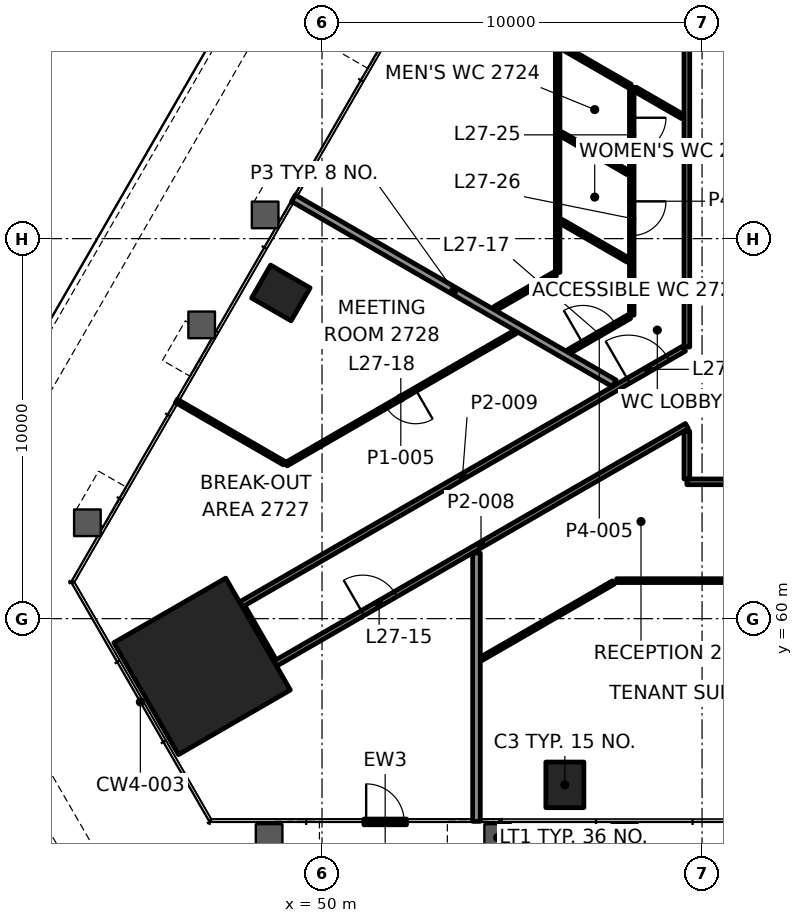
"""IFC4 building model, lengths in metres.
Left out: names, types, materials, properties, quantities, classifications, styles, units other than length and angle.
Written with IfcOpenShell. Run it as: python <this file> out.ifc"""

import sys

from ifc_helpers import new_model, si_unit, direction, frame, frame_2d, origin, origin_2d, place, context, subcontext, project, spatial, rectangle, extrude, element, fill, save


model = new_model("IFC4")
c1 = context("Model", 3, precision=1e-05, world=origin(), true_north=direction((0.0, 1.0)))
c2 = subcontext(c1, "Body", "Model", "MODEL_VIEW")
j1 = project(units=[si_unit("LENGTHUNIT", "METRE"), si_unit("PLANEANGLEUNIT", "RADIAN")], contexts=[c1])
p1 = place(None, origin())
s1 = spatial("IfcSite", under=j1, at=p1, CompositionType="ELEMENT")
p2 = place(p1, origin())
s2 = spatial("IfcBuilding", under=s1, at=p2, CompositionType="ELEMENT")
p3 = place(p2, frame((0.0, 0.0, 119.8)))
s3 = spatial("IfcBuildingStorey", under=s2, at=p3, CompositionType="ELEMENT", Elevation=119.8)
p4 = place(p3, frame((46.844, 58.744, 0.0), z_axis=(0.0, 0.0, 1.0), x_axis=(0.5, -0.866025403784, 0.0)))
e1 = element("IfcColumn", 1, at=p4, inside=s3, PredefinedType="COLUMN", context=c2, shape_type="SweptSolid", body=[
    extrude(rectangle(XDim=3.4, YDim=3.4, at=origin_2d()), origin(), (0.0, 0.0, 1.0), 4.2),
])
for number, where, z_axis, x_axis in (
    (2, (56.39, 55.626, -0.0), (0.0, 0.0, 1.0), (1.0, 0.0, 0.0)),
    (3, (48.917, 68.57, -0.0), (0.0, 0.0, 1.0), (-0.5, -0.866, 0.0)),
):
    element("IfcColumn", number, at=place(p3, frame(where, z_axis=z_axis, x_axis=x_axis)), inside=s3, PredefinedType="COLUMN", context=c2, shape_type="SweptSolid", body=[
        extrude(rectangle(XDim=1.0, YDim=1.2, at=origin_2d()), origin(), (0.0, 0.0, 1.0), 4.2),
    ])
p5 = place(p3, frame((57.751, 61.0, 0.0), z_axis=(0.0, 0.0, 1.0), x_axis=(1.0, 0.0, 0.0)))
e4 = element("IfcWall", 4, at=p5, inside=s3, PredefinedType="PARTITIONING", context=c2, shape_type="SweptSolid", body=[
    extrude(rectangle(XDim=33.533, YDim=0.1, at=frame_2d((16.766, 0.0))), origin(), (0.0, 0.0, 1.0), 3.4),
])
p6 = place(p5, frame((3.572, 0.0, 0.0)))
e5 = element("IfcOpeningElement", 5, at=p6, cuts=e4, PredefinedType="OPENING", context=c2, shape_type="SweptSolid", body=[
    extrude(rectangle(XDim=1.0, YDim=2.1, at=frame_2d((0.5, 1.05))), frame((0.0, 0.06, 0.0), z_axis=(0.0, -1.0, 0.0), x_axis=(1.0, 0.0, 0.0)), (0.0, 0.0, 1.0), 0.12),
])
p7 = place(p5, frame((9.822, 0.0, 0.0)))
e6 = element("IfcOpeningElement", 6, at=p7, cuts=e4, PredefinedType="OPENING", context=c2, shape_type="SweptSolid", body=[
    extrude(rectangle(XDim=0.9, YDim=2.1, at=frame_2d((0.45, 1.05))), frame((0.0, 0.06, 0.0), z_axis=(0.0, -1.0, 0.0), x_axis=(1.0, 0.0, 0.0)), (0.0, 0.0, 1.0), 0.12),
])
p8 = place(p5, frame((14.472, 0.0, 0.0)))
e7 = element("IfcOpeningElement", 7, at=p8, cuts=e4, PredefinedType="OPENING", context=c2, shape_type="SweptSolid", body=[
    extrude(rectangle(XDim=0.9, YDim=2.1, at=frame_2d((0.45, 1.05))), frame((0.0, 0.06, 0.0), z_axis=(0.0, -1.0, 0.0), x_axis=(1.0, 0.0, 0.0)), (0.0, 0.0, 1.0), 0.12),
])
p9 = place(p5, frame((19.124, 0.0, 0.0)))
e8 = element("IfcOpeningElement", 8, at=p9, cuts=e4, PredefinedType="OPENING", context=c2, shape_type="SweptSolid", body=[
    extrude(rectangle(XDim=0.9, YDim=2.1, at=frame_2d((0.45, 1.05))), frame((0.0, 0.06, 0.0), z_axis=(0.0, -1.0, 0.0), x_axis=(1.0, 0.0, 0.0)), (0.0, 0.0, 1.0), 0.12),
])
p10 = place(p5, frame((24.361, 0.0, 0.0)))
e9 = element("IfcOpeningElement", 9, at=p10, cuts=e4, PredefinedType="OPENING", context=c2, shape_type="SweptSolid", body=[
    extrude(rectangle(XDim=0.9, YDim=2.1, at=frame_2d((0.45, 1.05))), frame((0.0, 0.06, 0.0), z_axis=(0.0, -1.0, 0.0), x_axis=(1.0, 0.0, 0.0)), (0.0, 0.0, 1.0), 0.12),
])
p11 = place(p5, frame((30.073, 0.0, 0.0)))
e10 = element("IfcOpeningElement", 10, at=p11, cuts=e4, PredefinedType="OPENING", context=c2, shape_type="SweptSolid", body=[
    extrude(rectangle(XDim=0.9, YDim=2.1, at=frame_2d((0.45, 1.05))), frame((0.0, 0.06, 0.0), z_axis=(0.0, -1.0, 0.0), x_axis=(1.0, 0.0, 0.0)), (0.0, 0.0, 1.0), 0.12),
])
p12 = place(p3, frame((90.399, 63.6, 0.0), z_axis=(0.0, 0.0, 1.0), x_axis=(-1.0, 0.0, 0.0)))
e11 = element("IfcWall", 11, at=p12, inside=s3, PredefinedType="PARTITIONING", context=c2, shape_type="SweptSolid", body=[
    extrude(rectangle(XDim=30.799, YDim=0.15, at=frame_2d((15.4, 0.0))), origin(), (0.0, 0.0, 1.0), 3.4),
])
p13 = place(p12, frame((4.975, 0.0, 0.0)))
e12 = element("IfcOpeningElement", 12, at=p13, cuts=e11, PredefinedType="OPENING", context=c2, shape_type="SweptSolid", body=[
    extrude(rectangle(XDim=1.0, YDim=2.1, at=frame_2d((0.5, 1.05))), frame((0.0, 0.085, 0.0), z_axis=(0.0, -1.0, 0.0), x_axis=(1.0, 0.0, 0.0)), (0.0, 0.0, 1.0), 0.17),
])
p14 = place(p12, frame((17.226, 0.0, 0.0)))
e13 = element("IfcOpeningElement", 13, at=p14, cuts=e11, PredefinedType="OPENING", context=c2, shape_type="SweptSolid", body=[
    extrude(rectangle(XDim=1.0, YDim=2.1, at=frame_2d((0.5, 1.05))), frame((0.0, 0.085, 0.0), z_axis=(0.0, -1.0, 0.0), x_axis=(1.0, 0.0, 0.0)), (0.0, 0.0, 1.0), 0.17),
])
p15 = place(p12, frame((27.151, 0.0, 0.0)))
e14 = element("IfcOpeningElement", 14, at=p15, cuts=e11, PredefinedType="OPENING", context=c2, shape_type="SweptSolid", body=[
    extrude(rectangle(XDim=1.0, YDim=2.1, at=frame_2d((0.5, 1.05))), frame((0.0, 0.085, 0.0), z_axis=(0.0, -1.0, 0.0), x_axis=(1.0, 0.0, 0.0)), (0.0, 0.0, 1.0), 0.17),
])
p16 = place(p3, frame((54.189, 58.944, 0.0), z_axis=(0.0, 0.0, 1.0), x_axis=(0.866025502096, 0.499999829719, 0.0)))
e15 = element("IfcWall", 15, at=p16, inside=s3, PredefinedType="PARTITIONING", context=c2, shape_type="SweptSolid", body=[
    extrude(rectangle(XDim=4.013, YDim=0.1, at=frame_2d((2.006, 0.0))), origin(), (0.0, 0.0, 1.0), 3.4),
])
p17 = place(p3, frame((48.766, 58.815, 0.0), z_axis=(0.0, 0.0, 1.0), x_axis=(0.866028284225, 0.499995010897, 0.0)))
e16 = element("IfcWall", 16, at=p17, inside=s3, PredefinedType="PARTITIONING", context=c2, shape_type="SweptSolid", body=[
    extrude(rectangle(XDim=12.51, YDim=0.15, at=frame_2d((6.255, 0.0))), origin(), (0.0, 0.0, 1.0), 3.247),
])
p18 = place(p17, frame((2.66, 0.0, 0.0)))
e17 = element("IfcOpeningElement", 17, at=p18, cuts=e16, PredefinedType="OPENING", context=c2, shape_type="SweptSolid", body=[
    extrude(rectangle(XDim=1.0, YDim=2.1, at=frame_2d((0.5, 1.05))), frame((0.0, 0.085, 0.0), z_axis=(0.0, -1.0, 0.0), x_axis=(1.0, 0.0, 0.0)), (0.0, 0.0, 1.0), 0.17),
])
p19 = place(p3, frame((47.866, 60.374, 0.0), z_axis=(0.0, 0.0, 1.0), x_axis=(0.866031566243, 0.499989326157, 0.0)))
e18 = element("IfcWall", 18, at=p19, inside=s3, PredefinedType="PARTITIONING", context=c2, shape_type="SweptSolid", body=[
    extrude(rectangle(XDim=13.462, YDim=0.15, at=frame_2d((6.731, 0.0))), origin(), (0.0, 0.0, 1.0), 3.4),
])
p20 = place(p19, frame((11.774, 0.0, 0.0)))
e19 = element("IfcOpeningElement", 19, at=p20, cuts=e18, PredefinedType="OPENING", context=c2, shape_type="SweptSolid", body=[
    extrude(rectangle(XDim=1.2, YDim=2.1, at=frame_2d((0.6, 1.05))), frame((0.0, 0.085, 0.0), z_axis=(0.0, -1.0, 0.0), x_axis=(1.0, 0.0, 0.0)), (0.0, 0.0, 1.0), 0.17),
])
p21 = place(p3, frame((56.501, 67.033, 0.0), z_axis=(0.0, 0.0, 1.0), x_axis=(0.866023842607, 0.500002704028, 0.0)))
e20 = element("IfcWall", 20, at=p21, inside=s3, PredefinedType="PARTITIONING", context=c2, shape_type="SweptSolid", body=[
    extrude(rectangle(XDim=1.835, YDim=0.12, at=frame_2d((0.917, 0.0))), origin(), (0.0, 0.0, 1.0), 3.4),
])
p22 = place(p21, frame((0.417, 0.0, 0.0)))
e21 = element("IfcOpeningElement", 21, at=p22, cuts=e20, PredefinedType="OPENING", context=c2, shape_type="SweptSolid", body=[
    extrude(rectangle(XDim=1.0, YDim=2.1, at=frame_2d((0.5, 1.05))), frame((0.0, 0.07, 0.0), z_axis=(0.0, -1.0, 0.0), x_axis=(1.0, 0.0, 0.0)), (0.0, 0.0, 1.0), 0.14),
])
p23 = place(p3, frame((55.09, 67.547, 0.0), z_axis=(0.0, 0.0, 1.0), x_axis=(-0.8660245535, -0.500001472733, 0.0)))
e22 = element("IfcWall", 22, at=p23, inside=s3, PredefinedType="PARTITIONING", context=c2, shape_type="SweptSolid", body=[
    extrude(rectangle(XDim=6.968, YDim=0.1, at=frame_2d((3.484, 0.0))), origin(), (0.0, 0.0, 1.0), 3.4),
])
p24 = place(p23, frame((3.034, 0.0, 0.0)))
e23 = element("IfcOpeningElement", 23, at=p24, cuts=e22, PredefinedType="OPENING", context=c2, shape_type="SweptSolid", body=[
    extrude(rectangle(XDim=0.9, YDim=2.1, at=frame_2d((0.45, 1.05))), frame((0.0, 0.06, 0.0), z_axis=(0.0, -1.0, 0.0), x_axis=(1.0, 0.0, 0.0)), (0.0, 0.0, 1.0), 0.12),
])
p25 = place(p3, frame((54.551, 68.159, 0.0), z_axis=(0.0, 0.0, 1.0), x_axis=(0.866023842607, 0.500002704028, 0.0)))
e24 = element("IfcWall", 24, at=p25, inside=s3, PredefinedType="PARTITIONING", context=c2, shape_type="SweptSolid", body=[
    extrude(rectangle(XDim=1.835, YDim=0.12, at=frame_2d((0.917, 0.0))), origin(), (0.0, 0.0, 1.0), 3.4),
])
p26 = place(p3, frame((59.6, 63.675, 0.0), z_axis=(0.0, 0.0, 1.0), x_axis=(0.0, 1.0, 0.0)))
e25 = element("IfcWall", 25, at=p26, inside=s3, PredefinedType="PARTITIONING", context=c2, shape_type="SweptSolid", body=[
    extrude(rectangle(XDim=1.258, YDim=0.15, at=frame_2d((0.629, 0.0))), origin(), (0.0, 0.0, 1.0), 3.247),
])
p27 = place(p3, frame((59.6, 67.148, 0.0), z_axis=(0.0, 0.0, 1.0), x_axis=(0.0, 1.0, 0.0)))
e26 = element("IfcWall", 26, at=p27, inside=s3, PredefinedType="PARTITIONING", context=c2, shape_type="SweptSolid", body=[
    extrude(rectangle(XDim=19.251, YDim=0.15, at=frame_2d((9.626, 0.0))), origin(), (0.0, 0.0, 1.0), 3.4),
])
p28 = place(p3, frame((58.15, 73.984, 0.0), z_axis=(0.0, 0.0, 1.0), x_axis=(0.0, -1.0, 0.0)))
e27 = element("IfcWall", 27, at=p28, inside=s3, PredefinedType="PARTITIONING", context=c2, shape_type="SweptSolid", body=[
    extrude(rectangle(XDim=5.999, YDim=0.12, at=frame_2d((3.0, 0.0))), origin(), (0.0, 0.0, 1.0), 3.4),
])
p29 = place(p28, frame((0.803, 0.0, 0.0)))
e28 = element("IfcOpeningElement", 28, at=p29, cuts=e27, PredefinedType="OPENING", context=c2, shape_type="SweptSolid", body=[
    extrude(rectangle(XDim=0.9, YDim=2.1, at=frame_2d((0.45, 1.05))), frame((0.0, 0.07, 0.0), z_axis=(0.0, -1.0, 0.0), x_axis=(1.0, 0.0, 0.0)), (0.0, 0.0, 1.0), 0.14),
])
p30 = place(p28, frame((3.003, 0.0, 0.0)))
e29 = element("IfcOpeningElement", 29, at=p30, cuts=e27, PredefinedType="OPENING", context=c2, shape_type="SweptSolid", body=[
    extrude(rectangle(XDim=0.9, YDim=2.1, at=frame_2d((0.45, 1.05))), frame((0.0, 0.07, 0.0), z_axis=(0.0, -1.0, 0.0), x_axis=(1.0, 0.0, 0.0)), (0.0, 0.0, 1.0), 0.14),
])
p31 = place(p3, frame((56.2, 69.111, 0.0), z_axis=(0.0, 0.0, 1.0), x_axis=(0.0, 1.0, 0.0)))
e30 = element("IfcWall", 30, at=p31, inside=s3, PredefinedType="PARTITIONING", context=c2, shape_type="SweptSolid", body=[
    extrude(rectangle(XDim=5.999, YDim=0.12, at=frame_2d((2.999, 0.0))), origin(), (0.0, 0.0, 1.0), 3.4),
])
p32 = place(p3, frame((54.064, 54.666, 0.0), z_axis=(0.0, 0.0, 1.0), x_axis=(0.0, 1.0, 0.0)))
e31 = element("IfcWall", 31, at=p32, inside=s3, PredefinedType="PARTITIONING", context=c2, shape_type="SweptSolid", body=[
    extrude(rectangle(XDim=7.06, YDim=0.2, at=frame_2d((3.53, 0.0))), origin(), (0.0, 0.0, 1.0), 3.4),
])
p33 = place(p3, frame((48.728, 58.88, 0.0), z_axis=(0.0, 0.0, 1.0), x_axis=(-0.500008692254, 0.866020385251, 0.0)))
e32 = element("IfcWall", 32, at=p33, inside=s3, PredefinedType="PARTITIONING", context=c2, shape_type="SweptSolid", body=[
    extrude(rectangle(XDim=1.649, YDim=0.15, at=frame_2d((0.824, 0.0))), origin(), (0.0, 0.0, 1.0), 3.247),
])
p34 = place(p3, frame((59.49, 73.21, 0.0), z_axis=(0.0, 0.0, 1.0), x_axis=(-0.86596595808, 0.500102948848, 0.0)))
e33 = element("IfcWall", 33, at=p34, inside=s3, PredefinedType="PARTITIONING", context=c2, shape_type="SweptSolid", body=[
    extrude(rectangle(XDim=1.444, YDim=0.12, at=frame_2d((0.722, 0.0))), origin(), (0.0, 0.0, 1.0), 3.4),
])
for number, where, z_axis, x_axis in (
    (34, (58.055, 71.736, 0.0), (0.0, 0.0, 1.0), (-0.866, 0.5, 0.0)),
    (35, (58.055, 69.434, 0.0), (0.0, 0.0, 1.0), (-0.866, 0.5, 0.0)),
):
    element("IfcWall", number, at=place(p3, frame(where, z_axis=z_axis, x_axis=x_axis)), inside=s3, PredefinedType="PARTITIONING", context=c2, shape_type="SweptSolid", body=[
        extrude(rectangle(XDim=2.033, YDim=0.12, at=frame_2d((1.017, 0.0))), origin(), (0.0, 0.0, 1.0), 3.4),
    ])
p35 = place(p3, frame((57.689, 66.191, 0.0), z_axis=(0.0, 0.0, 1.0), x_axis=(-0.866022484486, 0.500005056339, 0.0)))
e36 = element("IfcWall", 36, at=p35, inside=s3, PredefinedType="PARTITIONING", context=c2, shape_type="SweptSolid", body=[
    extrude(rectangle(XDim=9.747, YDim=0.2, at=frame_2d((4.873, 0.0))), origin(), (0.0, 0.0, 1.0), 3.165),
])
p36 = place(p3, frame((49.005, 64.091, 0.0), z_axis=(0.0, 0.0, 1.0), x_axis=(-0.866005637992, 0.500034233794, 0.0)))
e37 = element("IfcWall", 37, at=p36, inside=s3, PredefinedType="PARTITIONING", context=c2, shape_type="SweptSolid", body=[
    extrude(rectangle(XDim=3.276, YDim=0.1, at=frame_2d((1.638, 0.0))), origin(), (0.0, 0.0, 1.0), 3.4),
])
p37 = place(p3, frame((58.105, 74.01, 0.0), z_axis=(0.0, 0.0, 1.0), x_axis=(-0.866028046028, 0.499995423472, 0.0)))
e38 = element("IfcWall", 38, at=p37, inside=s3, PredefinedType="PARTITIONING", context=c2, shape_type="SweptSolid", body=[
    extrude(rectangle(XDim=2.09, YDim=0.12, at=frame_2d((1.045, 0.0))), origin(), (0.0, 0.0, 1.0), 3.4),
])
p38 = place(p3, frame((69.117, 112.258, 0.0), z_axis=(0.0, 0.0, 1.0), x_axis=(-0.500000992643, -0.866024830681, 0.0)))
e39 = element("IfcWall", 39, at=p38, inside=s3, PredefinedType="SOLIDWALL", context=c2, shape_type="SweptSolid", body=[
    extrude(rectangle(XDim=58.649, YDim=0.8, at=frame_2d((29.325, 0.0))), origin(), (0.0, 0.0, 1.0), 0.9),
])
p39 = place(p3, frame((39.792, 60.457, 0.0), z_axis=(0.0, 0.0, 1.0), x_axis=(0.50001002959, -0.86601961312, 0.0)))
e40 = element("IfcWall", 40, at=p39, inside=s3, PredefinedType="SOLIDWALL", context=c2, shape_type="SweptSolid", body=[
    extrude(rectangle(XDim=10.019, YDim=0.8, at=frame_2d((5.009, 0.0))), origin(), (0.0, 0.0, 1.0), 0.9),
])
p40 = place(p18, origin())
e41 = element("IfcDoor", 41, at=p40, inside=s3, OperationType="SINGLE_SWING_RIGHT", PredefinedType="DOOR", context=c2, shape_type="SweptSolid", body=[
    extrude(rectangle(XDim=1.0, YDim=2.1, at=frame_2d((0.5, 1.05))), frame((0.0, 0.025, 0.0), z_axis=(0.0, -1.0, 0.0), x_axis=(1.0, 0.0, 0.0)), (0.0, 0.0, 1.0), 0.05),
])
fill(e17, e41)
p41 = place(p20, origin())
e42 = element("IfcDoor", 42, at=p41, inside=s3, OperationType="DOUBLE_DOOR_SINGLE_SWING", PredefinedType="DOOR", context=c2, shape_type="SweptSolid", body=[
    extrude(rectangle(XDim=1.2, YDim=2.1, at=frame_2d((0.6, 1.05))), frame((0.0, 0.025, 0.0), z_axis=(0.0, -1.0, 0.0), x_axis=(1.0, 0.0, 0.0)), (0.0, 0.0, 1.0), 0.05),
])
fill(e19, e42)
p42 = place(p22, origin())
e43 = element("IfcDoor", 43, at=p42, inside=s3, OperationType="SINGLE_SWING_LEFT", PredefinedType="DOOR", context=c2, shape_type="SweptSolid", body=[
    extrude(rectangle(XDim=1.0, YDim=2.1, at=frame_2d((0.5, 1.05))), frame((0.0, 0.025, 0.0), z_axis=(0.0, -1.0, 0.0), x_axis=(1.0, 0.0, 0.0)), (0.0, 0.0, 1.0), 0.05),
])
fill(e21, e43)
p43 = place(p24, origin())
e44 = element("IfcDoor", 44, at=p43, inside=s3, OperationType="SINGLE_SWING_RIGHT", PredefinedType="DOOR", context=c2, shape_type="SweptSolid", body=[
    extrude(rectangle(XDim=0.9, YDim=2.1, at=frame_2d((0.45, 1.05))), frame((0.0, 0.025, 0.0), z_axis=(0.0, -1.0, 0.0), x_axis=(1.0, 0.0, 0.0)), (0.0, 0.0, 1.0), 0.05),
])
fill(e23, e44)
p44 = place(p29, origin())
e45 = element("IfcDoor", 45, at=p44, inside=s3, OperationType="SINGLE_SWING_RIGHT", PredefinedType="DOOR", context=c2, shape_type="SweptSolid", body=[
    extrude(rectangle(XDim=0.9, YDim=2.1, at=frame_2d((0.45, 1.05))), frame((0.0, 0.025, 0.0), z_axis=(0.0, -1.0, 0.0), x_axis=(1.0, 0.0, 0.0)), (0.0, 0.0, 1.0), 0.05),
])
fill(e28, e45)
p45 = place(p30, origin())
e46 = element("IfcDoor", 46, at=p45, inside=s3, OperationType="SINGLE_SWING_LEFT", PredefinedType="DOOR", context=c2, shape_type="SweptSolid", body=[
    extrude(rectangle(XDim=0.9, YDim=2.1, at=frame_2d((0.45, 1.05))), frame((0.0, 0.025, 0.0), z_axis=(0.0, -1.0, 0.0), x_axis=(1.0, 0.0, 0.0)), (0.0, 0.0, 1.0), 0.05),
])
fill(e29, e46)
p46 = place(p3, frame((51.102, 54.651, 0.0), z_axis=(0.0, 0.0, 1.0), x_axis=(1.0, 0.0, 0.0)))
p47 = place(p46, frame((0.06, 0.0, 0.0)))
p48 = place(p47, origin())
e47 = element("IfcDoor", 47, at=p48, inside=s3, OperationType="SINGLE_SWING_RIGHT", PredefinedType="DOOR", context=c2, shape_type="SweptSolid", body=[
    extrude(rectangle(XDim=1.0, YDim=2.1, at=frame_2d((0.5, 1.05))), frame((0.0, 0.025, 0.0), z_axis=(0.0, -1.0, 0.0), x_axis=(1.0, 0.0, 0.0)), (0.0, 0.0, 1.0), 0.05),
])
save(model, sys.argv[1])
